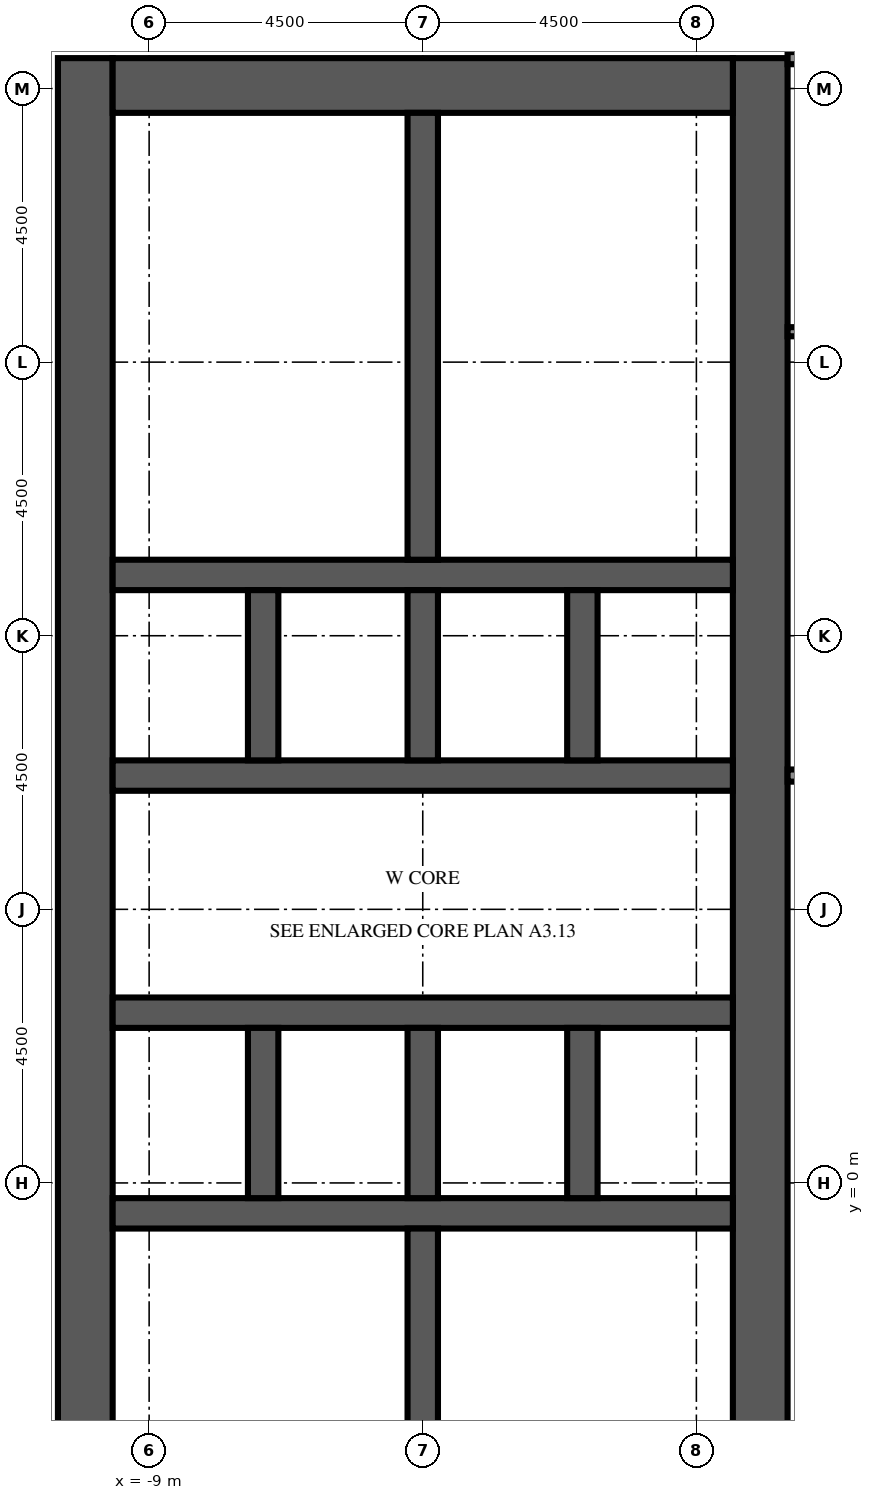
"""IFC4 building model, lengths in metres.
Left out: names, types, materials, properties, quantities, classifications, styles, units other than length and angle.
Written with IfcOpenShell. Run it as: python <this file> out.ifc"""

import sys

from ifc_helpers import new_model, si_unit, direction, frame, frame_2d, origin, place, context, subcontext, project, spatial, rectangle, extrude, element, fill, save


model = new_model("IFC4")
c1 = context("Model", 3, precision=1e-05, world=origin(), true_north=direction((0.0, 1.0)))
c2 = subcontext(c1, "Body", "Model", "MODEL_VIEW")
j1 = project(units=[si_unit("LENGTHUNIT", "METRE"), si_unit("PLANEANGLEUNIT", "RADIAN")], contexts=[c1])
p1 = place(None, origin())
s1 = spatial("IfcSite", under=j1, at=p1, CompositionType="ELEMENT")
p2 = place(p1, origin())
s2 = spatial("IfcBuilding", under=s1, at=p2, CompositionType="ELEMENT")
p3 = place(p2, frame((0.0, 0.0, 76.6)))
s3 = spatial("IfcBuildingStorey", under=s2, at=p3, CompositionType="ELEMENT", Elevation=76.6)
p4 = place(p3, frame((-10.05, -9.0, 0.0), z_axis=(0.0, 0.0, 1.0), x_axis=(0.0, 1.0, 0.0)))
e1 = element("IfcWall", 1, at=p4, inside=s3, PredefinedType="SHEAR", context=c2, shape_type="SweptSolid", body=[
    extrude(rectangle(XDim=27.5, YDim=0.9, at=frame_2d((13.75, 0.0))), origin(), (0.0, 0.0, 1.0), 5.4),
])
p5 = place(p4, frame((12.55, 0.0, 0.0)))
e2 = element("IfcOpeningElement", 2, at=p5, cuts=e1, PredefinedType="OPENING", context=c2, shape_type="SweptSolid", body=[
    extrude(rectangle(XDim=2.4, YDim=2.4, at=frame_2d((1.2, 1.2))), frame((0.0, 0.46, 0.0), z_axis=(0.0, -1.0, 0.0), x_axis=(1.0, 0.0, 0.0)), (0.0, 0.0, 1.0), 0.92),
])
p6 = place(p4, frame((6.825, 0.0, 0.0)))
e3 = element("IfcOpeningElement", 3, at=p6, cuts=e1, PredefinedType="OPENING", context=c2, shape_type="SweptSolid", body=[
    extrude(rectangle(XDim=1.2, YDim=2.1, at=frame_2d((0.6, 1.05))), frame((0.0, 0.46, 0.0), z_axis=(0.0, -1.0, 0.0), x_axis=(1.0, 0.0, 0.0)), (0.0, 0.0, 1.0), 0.92),
])
p7 = place(p4, frame((19.475, 0.0, 0.0)))
e4 = element("IfcOpeningElement", 4, at=p7, cuts=e1, PredefinedType="OPENING", context=c2, shape_type="SweptSolid", body=[
    extrude(rectangle(XDim=1.2, YDim=2.1, at=frame_2d((0.6, 1.05))), frame((0.0, 0.46, 0.0), z_axis=(0.0, -1.0, 0.0), x_axis=(1.0, 0.0, 0.0)), (0.0, 0.0, 1.0), 0.92),
])
p8 = place(p3, frame((1.05, -9.0, 0.0), z_axis=(0.0, 0.0, 1.0), x_axis=(0.0, 1.0, 0.0)))
e5 = element("IfcWall", 5, at=p8, inside=s3, PredefinedType="SHEAR", context=c2, shape_type="SweptSolid", body=[
    extrude(rectangle(XDim=27.5, YDim=0.9, at=frame_2d((13.75, 0.0))), origin(), (0.0, 0.0, 1.0), 5.4),
])
p9 = place(p8, frame((12.55, 0.0, 0.0)))
e6 = element("IfcOpeningElement", 6, at=p9, cuts=e5, PredefinedType="OPENING", context=c2, shape_type="SweptSolid", body=[
    extrude(rectangle(XDim=2.4, YDim=2.4, at=frame_2d((1.2, 1.2))), frame((0.0, 0.46, 0.0), z_axis=(0.0, -1.0, 0.0), x_axis=(1.0, 0.0, 0.0)), (0.0, 0.0, 1.0), 0.92),
])
p10 = place(p8, frame((5.445, 0.0, 0.0)))
e7 = element("IfcOpeningElement", 7, at=p10, cuts=e5, PredefinedType="OPENING", context=c2, shape_type="SweptSolid", body=[
    extrude(rectangle(XDim=1.2, YDim=2.1, at=frame_2d((0.6, 1.05))), frame((0.0, 0.46, 0.0), z_axis=(0.0, -1.0, 0.0), x_axis=(1.0, 0.0, 0.0)), (0.0, 0.0, 1.0), 0.92),
])
p11 = place(p8, frame((19.485, 0.0, 0.0)))
e8 = element("IfcOpeningElement", 8, at=p11, cuts=e5, PredefinedType="OPENING", context=c2, shape_type="SweptSolid", body=[
    extrude(rectangle(XDim=1.0, YDim=2.1, at=frame_2d((0.5, 1.05))), frame((0.0, 0.46, 0.0), z_axis=(0.0, -1.0, 0.0), x_axis=(1.0, 0.0, 0.0)), (0.0, 0.0, 1.0), 0.92),
])
p12 = place(p8, frame((21.139, 0.0, 0.0)))
e9 = element("IfcOpeningElement", 9, at=p12, cuts=e5, PredefinedType="OPENING", context=c2, shape_type="SweptSolid", body=[
    extrude(rectangle(XDim=1.0, YDim=2.1, at=frame_2d((0.5, 1.05))), frame((0.0, 0.46, 0.0), z_axis=(0.0, -1.0, 0.0), x_axis=(1.0, 0.0, 0.0)), (0.0, 0.0, 1.0), 0.92),
])
p13 = place(p8, frame((23.16, 0.0, 0.0)))
e10 = element("IfcOpeningElement", 10, at=p13, cuts=e5, PredefinedType="OPENING", context=c2, shape_type="SweptSolid", body=[
    extrude(rectangle(XDim=1.0, YDim=2.1, at=frame_2d((0.5, 1.05))), frame((0.0, 0.46, 0.0), z_axis=(0.0, -1.0, 0.0), x_axis=(1.0, 0.0, 0.0)), (0.0, 0.0, 1.0), 0.92),
])
p14 = place(p8, frame((25.181, 0.0, 0.0)))
e11 = element("IfcOpeningElement", 11, at=p14, cuts=e5, PredefinedType="OPENING", context=c2, shape_type="SweptSolid", body=[
    extrude(rectangle(XDim=1.0, YDim=2.1, at=frame_2d((0.5, 1.05))), frame((0.0, 0.46, 0.0), z_axis=(0.0, -1.0, 0.0), x_axis=(1.0, 0.0, 0.0)), (0.0, 0.0, 1.0), 0.92),
])
p15 = place(p3, frame((-9.6, 18.05, 0.0), z_axis=(0.0, 0.0, 1.0), x_axis=(1.0, 0.0, 0.0)))
e12 = element("IfcWall", 12, at=p15, inside=s3, PredefinedType="SHEAR", context=c2, shape_type="SweptSolid", body=[
    extrude(rectangle(XDim=10.2, YDim=0.9, at=frame_2d((5.1, 0.0))), origin(), (0.0, 0.0, 1.0), 5.4),
])
p16 = place(p3, frame((-9.6, -0.5, 0.0), z_axis=(0.0, 0.0, 1.0), x_axis=(1.0, 0.0, 0.0)))
e13 = element("IfcWall", 13, at=p16, inside=s3, PredefinedType="SHEAR", context=c2, shape_type="SweptSolid", body=[
    extrude(rectangle(XDim=10.2, YDim=0.5, at=frame_2d((5.1, 0.0))), origin(), (0.0, 0.0, 1.0), 5.4),
])
p17 = place(p3, frame((-9.6, 2.8, 0.0), z_axis=(0.0, 0.0, 1.0), x_axis=(1.0, 0.0, 0.0)))
e14 = element("IfcWall", 14, at=p17, inside=s3, PredefinedType="SHEAR", context=c2, shape_type="SweptSolid", body=[
    extrude(rectangle(XDim=10.2, YDim=0.5, at=frame_2d((5.1, 0.0))), origin(), (0.0, 0.0, 1.0), 5.4),
])
p18 = place(p17, frame((0.562, 0.0, 0.0)))
e15 = element("IfcOpeningElement", 15, at=p18, cuts=e14, PredefinedType="OPENING", context=c2, shape_type="SweptSolid", body=[
    extrude(rectangle(XDim=1.1, YDim=2.1, at=frame_2d((0.55, 1.05))), frame((0.0, 0.26, 0.0), z_axis=(0.0, -1.0, 0.0), x_axis=(1.0, 0.0, 0.0)), (0.0, 0.0, 1.0), 0.52),
])
p19 = place(p17, frame((3.238, 0.0, 0.0)))
e16 = element("IfcOpeningElement", 16, at=p19, cuts=e14, PredefinedType="OPENING", context=c2, shape_type="SweptSolid", body=[
    extrude(rectangle(XDim=1.1, YDim=2.1, at=frame_2d((0.55, 1.05))), frame((0.0, 0.26, 0.0), z_axis=(0.0, -1.0, 0.0), x_axis=(1.0, 0.0, 0.0)), (0.0, 0.0, 1.0), 0.52),
])
p20 = place(p17, frame((8.538, 0.0, 0.0)))
e17 = element("IfcOpeningElement", 17, at=p20, cuts=e14, PredefinedType="OPENING", context=c2, shape_type="SweptSolid", body=[
    extrude(rectangle(XDim=1.1, YDim=2.1, at=frame_2d((0.55, 1.05))), frame((0.0, 0.26, 0.0), z_axis=(0.0, -1.0, 0.0), x_axis=(1.0, 0.0, 0.0)), (0.0, 0.0, 1.0), 0.52),
])
p21 = place(p3, frame((-9.6, 6.7, 0.0), z_axis=(0.0, 0.0, 1.0), x_axis=(1.0, 0.0, 0.0)))
e18 = element("IfcWall", 18, at=p21, inside=s3, PredefinedType="SHEAR", context=c2, shape_type="SweptSolid", body=[
    extrude(rectangle(XDim=10.2, YDim=0.5, at=frame_2d((5.1, 0.0))), origin(), (0.0, 0.0, 1.0), 5.4),
])
p22 = place(p21, frame((0.562, 0.0, 0.0)))
e19 = element("IfcOpeningElement", 19, at=p22, cuts=e18, PredefinedType="OPENING", context=c2, shape_type="SweptSolid", body=[
    extrude(rectangle(XDim=1.1, YDim=2.1, at=frame_2d((0.55, 1.05))), frame((0.0, 0.26, 0.0), z_axis=(0.0, -1.0, 0.0), x_axis=(1.0, 0.0, 0.0)), (0.0, 0.0, 1.0), 0.52),
])
p23 = place(p21, frame((3.288, 0.0, 0.0)))
e20 = element("IfcOpeningElement", 20, at=p23, cuts=e18, PredefinedType="OPENING", context=c2, shape_type="SweptSolid", body=[
    extrude(rectangle(XDim=1.0, YDim=2.1, at=frame_2d((0.5, 1.05))), frame((0.0, 0.26, 0.0), z_axis=(0.0, -1.0, 0.0), x_axis=(1.0, 0.0, 0.0)), (0.0, 0.0, 1.0), 0.52),
])
p24 = place(p21, frame((5.913, 0.0, 0.0)))
e21 = element("IfcOpeningElement", 21, at=p24, cuts=e18, PredefinedType="OPENING", context=c2, shape_type="SweptSolid", body=[
    extrude(rectangle(XDim=1.0, YDim=2.1, at=frame_2d((0.5, 1.05))), frame((0.0, 0.26, 0.0), z_axis=(0.0, -1.0, 0.0), x_axis=(1.0, 0.0, 0.0)), (0.0, 0.0, 1.0), 0.52),
])
p25 = place(p21, frame((8.587, 0.0, 0.0)))
e22 = element("IfcOpeningElement", 22, at=p25, cuts=e18, PredefinedType="OPENING", context=c2, shape_type="SweptSolid", body=[
    extrude(rectangle(XDim=1.0, YDim=2.1, at=frame_2d((0.5, 1.05))), frame((0.0, 0.26, 0.0), z_axis=(0.0, -1.0, 0.0), x_axis=(1.0, 0.0, 0.0)), (0.0, 0.0, 1.0), 0.52),
])
p26 = place(p3, frame((-9.6, 10.0, 0.0), z_axis=(0.0, 0.0, 1.0), x_axis=(1.0, 0.0, 0.0)))
e23 = element("IfcWall", 23, at=p26, inside=s3, PredefinedType="SHEAR", context=c2, shape_type="SweptSolid", body=[
    extrude(rectangle(XDim=10.2, YDim=0.5, at=frame_2d((5.1, 0.0))), origin(), (0.0, 0.0, 1.0), 5.4),
])
for number, where, z_axis, x_axis in (
    (24, (-7.125, -0.25, 0.0), (0.0, 0.0, 1.0), (0.0, 1.0, 0.0)),
    (25, (-7.125, 6.95, 0.0), (0.0, 0.0, 1.0), (0.0, 1.0, 0.0)),
    (26, (-4.5, -0.25, 0.0), (0.0, 0.0, 1.0), (0.0, 1.0, 0.0)),
    (27, (-4.5, 6.95, 0.0), (0.0, 0.0, 1.0), (0.0, 1.0, 0.0)),
    (28, (-1.875, -0.25, 0.0), (0.0, 0.0, 1.0), (0.0, 1.0, 0.0)),
    (29, (-1.875, 6.95, 0.0), (0.0, 0.0, 1.0), (0.0, 1.0, 0.0)),
):
    element("IfcWall", number, at=place(p3, frame(where, z_axis=z_axis, x_axis=x_axis)), inside=s3, PredefinedType="SHEAR", context=c2, shape_type="SweptSolid", body=[
        extrude(rectangle(XDim=2.8, YDim=0.5, at=frame_2d((1.4, 0.0))), origin(), (0.0, 0.0, 1.0), 5.4),
    ])
for number, where, z_axis, x_axis in (
    (30, (-4.5, -8.1, 0.0), (0.0, 0.0, 1.0), (0.0, 1.0, 0.0)),
    (31, (-4.5, 10.25, 0.0), (0.0, 0.0, 1.0), (0.0, 1.0, 0.0)),
):
    element("IfcWall", number, at=place(p3, frame(where, z_axis=z_axis, x_axis=x_axis)), inside=s3, PredefinedType="SHEAR", context=c2, shape_type="SweptSolid", body=[
        extrude(rectangle(XDim=7.35, YDim=0.5, at=frame_2d((3.675, 0.0))), origin(), (0.0, 0.0, 1.0), 5.4),
    ])
p27 = place(p3, frame((-0.9, -5.16, 0.0), z_axis=(0.0, 0.0, 1.0), x_axis=(0.0, 1.0, 0.0)))
e32 = element("IfcWall", 32, at=p27, inside=s3, PredefinedType="PARTITIONING", context=c2, shape_type="SweptSolid", body=[
    extrude(rectangle(XDim=2.205, YDim=0.1, at=frame_2d((1.103, 0.0))), origin(), (0.0, 0.0, 1.0), 4.95),
])
p28 = place(p27, frame((0.603, 0.0, 0.0)))
e33 = element("IfcOpeningElement", 33, at=p28, cuts=e32, PredefinedType="OPENING", context=c2, shape_type="SweptSolid", body=[
    extrude(rectangle(XDim=1.0, YDim=2.1, at=frame_2d((0.5, 1.05))), frame((0.0, 0.06, 0.0), z_axis=(0.0, -1.0, 0.0), x_axis=(1.0, 0.0, 0.0)), (0.0, 0.0, 1.0), 0.12),
])
p29 = place(p3, frame((-0.9, -2.955, 0.0), z_axis=(0.0, 0.0, 1.0), x_axis=(0.0, 1.0, 0.0)))
e34 = element("IfcWall", 34, at=p29, inside=s3, PredefinedType="PARTITIONING", context=c2, shape_type="SweptSolid", body=[
    extrude(rectangle(XDim=2.205, YDim=0.1, at=frame_2d((1.103, 0.0))), origin(), (0.0, 0.0, 1.0), 4.95),
])
p30 = place(p29, frame((0.603, 0.0, 0.0)))
e35 = element("IfcOpeningElement", 35, at=p30, cuts=e34, PredefinedType="OPENING", context=c2, shape_type="SweptSolid", body=[
    extrude(rectangle(XDim=1.0, YDim=2.1, at=frame_2d((0.5, 1.05))), frame((0.0, 0.06, 0.0), z_axis=(0.0, -1.0, 0.0), x_axis=(1.0, 0.0, 0.0)), (0.0, 0.0, 1.0), 0.12),
])
p31 = place(p3, frame((-4.25, -2.955, 0.0), z_axis=(0.0, 0.0, 1.0), x_axis=(1.0, 0.0, 0.0)))
e36 = element("IfcWall", 36, at=p31, inside=s3, PredefinedType="PARTITIONING", context=c2, shape_type="SweptSolid", body=[
    extrude(rectangle(XDim=3.35, YDim=0.1, at=frame_2d((1.675, 0.0))), origin(), (0.0, 0.0, 1.0), 4.95),
])
for number, where, z_axis, x_axis in (
    (37, (-4.25, 11.72, 0.0), (0.0, 0.0, 1.0), (1.0, 0.0, 0.0)),
    (38, (-4.25, 13.558, 0.0), (0.0, 0.0, 1.0), (1.0, 0.0, 0.0)),
    (39, (-4.25, 15.762, 0.0), (0.0, 0.0, 1.0), (1.0, 0.0, 0.0)),
):
    element("IfcWall", number, at=place(p3, frame(where, z_axis=z_axis, x_axis=x_axis)), inside=s3, PredefinedType="PARTITIONING", context=c2, shape_type="SweptSolid", body=[
        extrude(rectangle(XDim=4.85, YDim=0.1, at=frame_2d((2.425, 0.0))), origin(), (0.0, 0.0, 1.0), 4.95),
    ])
p32 = place(p3, frame((1.5, 6.7, 0.0), z_axis=(0.0, 0.0, 1.0), x_axis=(1.0, 0.0, 0.0)))
e40 = element("IfcWall", 40, at=p32, inside=s3, PredefinedType="PARTITIONING", context=c2, shape_type="SweptSolid", body=[
    extrude(rectangle(XDim=4.5, YDim=0.2, at=frame_2d((2.25, 0.0))), origin(), (0.0, 0.0, 1.0), 4.95),
])
p33 = place(p32, frame((1.1, 0.0, 0.0)))
e41 = element("IfcOpeningElement", 41, at=p33, cuts=e40, PredefinedType="OPENING", context=c2, shape_type="SweptSolid", body=[
    extrude(rectangle(XDim=1.0, YDim=2.1, at=frame_2d((0.5, 1.05))), frame((0.0, 0.11, 0.0), z_axis=(0.0, -1.0, 0.0), x_axis=(1.0, 0.0, 0.0)), (0.0, 0.0, 1.0), 0.22),
])
p34 = place(p3, frame((1.5, 14.0, 0.0), z_axis=(0.0, 0.0, 1.0), x_axis=(1.0, 0.0, 0.0)))
e42 = element("IfcWall", 42, at=p34, inside=s3, PredefinedType="PARTITIONING", context=c2, shape_type="SweptSolid", body=[
    extrude(rectangle(XDim=4.5, YDim=0.15, at=frame_2d((2.25, 0.0))), origin(), (0.0, 0.0, 1.0), 4.95),
])
p35 = place(p34, frame((1.85, 0.0, 0.0)))
e43 = element("IfcOpeningElement", 43, at=p35, cuts=e42, PredefinedType="OPENING", context=c2, shape_type="SweptSolid", body=[
    extrude(rectangle(XDim=1.0, YDim=2.1, at=frame_2d((0.5, 1.05))), frame((0.0, 0.085, 0.0), z_axis=(0.0, -1.0, 0.0), x_axis=(1.0, 0.0, 0.0)), (0.0, 0.0, 1.0), 0.17),
])
p36 = place(p3, frame((1.5, 18.5, 0.0), z_axis=(0.0, 0.0, 1.0), x_axis=(1.0, 0.0, 0.0)))
e44 = element("IfcWall", 44, at=p36, inside=s3, PredefinedType="PARTITIONING", context=c2, shape_type="SweptSolid", body=[
    extrude(rectangle(XDim=4.5, YDim=0.2, at=frame_2d((2.25, 0.0))), origin(), (0.0, 0.0, 1.0), 4.95),
])
p37 = place(p18, origin())
e45 = element("IfcDoor", 45, at=p37, inside=s3, OperationType="DOUBLE_DOOR_SLIDING", PredefinedType="DOOR", context=c2, shape_type="SweptSolid", body=[
    extrude(rectangle(XDim=1.1, YDim=2.1, at=frame_2d((0.55, 1.05))), frame((0.0, 0.025, 0.0), z_axis=(0.0, -1.0, 0.0), x_axis=(1.0, 0.0, 0.0)), (0.0, 0.0, 1.0), 0.05),
])
fill(e15, e45)
p38 = place(p19, origin())
e46 = element("IfcDoor", 46, at=p38, inside=s3, OperationType="DOUBLE_DOOR_SLIDING", PredefinedType="DOOR", context=c2, shape_type="SweptSolid", body=[
    extrude(rectangle(XDim=1.1, YDim=2.1, at=frame_2d((0.55, 1.05))), frame((0.0, 0.025, 0.0), z_axis=(0.0, -1.0, 0.0), x_axis=(1.0, 0.0, 0.0)), (0.0, 0.0, 1.0), 0.05),
])
fill(e16, e46)
p39 = place(p20, origin())
e47 = element("IfcDoor", 47, at=p39, inside=s3, OperationType="DOUBLE_DOOR_SLIDING", PredefinedType="DOOR", context=c2, shape_type="SweptSolid", body=[
    extrude(rectangle(XDim=1.1, YDim=2.1, at=frame_2d((0.55, 1.05))), frame((0.0, 0.025, 0.0), z_axis=(0.0, -1.0, 0.0), x_axis=(1.0, 0.0, 0.0)), (0.0, 0.0, 1.0), 0.05),
])
fill(e17, e47)
p40 = place(p22, origin())
e48 = element("IfcDoor", 48, at=p40, inside=s3, OperationType="DOUBLE_DOOR_SLIDING", PredefinedType="DOOR", context=c2, shape_type="SweptSolid", body=[
    extrude(rectangle(XDim=1.1, YDim=2.1, at=frame_2d((0.55, 1.05))), frame((0.0, 0.025, 0.0), z_axis=(0.0, -1.0, 0.0), x_axis=(1.0, 0.0, 0.0)), (0.0, 0.0, 1.0), 0.05),
])
fill(e19, e48)
p41 = place(p5, origin())
e49 = element("IfcDoor", 49, at=p41, inside=s3, OperationType="DOUBLE_DOOR_DOUBLE_SWING", PredefinedType="DOOR", context=c2, shape_type="SweptSolid", body=[
    extrude(rectangle(XDim=2.4, YDim=2.4, at=frame_2d((1.2, 1.2))), frame((0.0, 0.025, 0.0), z_axis=(0.0, -1.0, 0.0), x_axis=(1.0, 0.0, 0.0)), (0.0, 0.0, 1.0), 0.05),
])
fill(e2, e49)
p42 = place(p9, origin())
e50 = element("IfcDoor", 50, at=p42, inside=s3, OperationType="DOUBLE_DOOR_DOUBLE_SWING", PredefinedType="DOOR", context=c2, shape_type="SweptSolid", body=[
    extrude(rectangle(XDim=2.4, YDim=2.4, at=frame_2d((1.2, 1.2))), frame((0.0, 0.025, 0.0), z_axis=(0.0, -1.0, 0.0), x_axis=(1.0, 0.0, 0.0)), (0.0, 0.0, 1.0), 0.05),
])
fill(e6, e50)
p43 = place(p6, origin())
e51 = element("IfcDoor", 51, at=p43, inside=s3, OperationType="SINGLE_SWING_LEFT", PredefinedType="DOOR", context=c2, shape_type="SweptSolid", body=[
    extrude(rectangle(XDim=1.2, YDim=2.1, at=frame_2d((0.6, 1.05))), frame((0.0, 0.025, 0.0), z_axis=(0.0, -1.0, 0.0), x_axis=(1.0, 0.0, 0.0)), (0.0, 0.0, 1.0), 0.05),
])
fill(e3, e51)
p44 = place(p7, origin())
e52 = element("IfcDoor", 52, at=p44, inside=s3, OperationType="SINGLE_SWING_LEFT", PredefinedType="DOOR", context=c2, shape_type="SweptSolid", body=[
    extrude(rectangle(XDim=1.2, YDim=2.1, at=frame_2d((0.6, 1.05))), frame((0.0, 0.025, 0.0), z_axis=(0.0, -1.0, 0.0), x_axis=(1.0, 0.0, 0.0)), (0.0, 0.0, 1.0), 0.05),
])
fill(e4, e52)
p45 = place(p23, origin())
e53 = element("IfcDoor", 53, at=p45, inside=s3, OperationType="SINGLE_SWING_RIGHT", PredefinedType="DOOR", context=c2, shape_type="SweptSolid", body=[
    extrude(rectangle(XDim=1.0, YDim=2.1, at=frame_2d((0.5, 1.05))), frame((0.0, 0.025, 0.0), z_axis=(0.0, -1.0, 0.0), x_axis=(1.0, 0.0, 0.0)), (0.0, 0.0, 1.0), 0.05),
])
fill(e20, e53)
p46 = place(p24, origin())
e54 = element("IfcDoor", 54, at=p46, inside=s3, OperationType="SINGLE_SWING_LEFT", PredefinedType="DOOR", context=c2, shape_type="SweptSolid", body=[
    extrude(rectangle(XDim=1.0, YDim=2.1, at=frame_2d((0.5, 1.05))), frame((0.0, 0.025, 0.0), z_axis=(0.0, -1.0, 0.0), x_axis=(1.0, 0.0, 0.0)), (0.0, 0.0, 1.0), 0.05),
])
fill(e21, e54)
p47 = place(p25, origin())
e55 = element("IfcDoor", 55, at=p47, inside=s3, OperationType="SINGLE_SWING_RIGHT", PredefinedType="DOOR", context=c2, shape_type="SweptSolid", body=[
    extrude(rectangle(XDim=1.0, YDim=2.1, at=frame_2d((0.5, 1.05))), frame((0.0, 0.025, 0.0), z_axis=(0.0, -1.0, 0.0), x_axis=(1.0, 0.0, 0.0)), (0.0, 0.0, 1.0), 0.05),
])
fill(e22, e55)
p48 = place(p10, origin())
e56 = element("IfcDoor", 56, at=p48, inside=s3, OperationType="SINGLE_SWING_LEFT", PredefinedType="DOOR", context=c2, shape_type="SweptSolid", body=[
    extrude(rectangle(XDim=1.2, YDim=2.1, at=frame_2d((0.6, 1.05))), frame((0.0, 0.425, 0.0), z_axis=(0.0, -1.0, 0.0), x_axis=(1.0, 0.0, 0.0)), (0.0, 0.0, 1.0), 0.05),
])
fill(e7, e56)
p49 = place(p28, origin())
e57 = element("IfcDoor", 57, at=p49, inside=s3, OperationType="SINGLE_SWING_LEFT", PredefinedType="DOOR", context=c2, shape_type="SweptSolid", body=[
    extrude(rectangle(XDim=1.0, YDim=2.1, at=frame_2d((0.5, 1.05))), frame((0.0, 0.025, 0.0), z_axis=(0.0, -1.0, 0.0), x_axis=(1.0, 0.0, 0.0)), (0.0, 0.0, 1.0), 0.05),
])
fill(e33, e57)
p50 = place(p30, origin())
e58 = element("IfcDoor", 58, at=p50, inside=s3, OperationType="SINGLE_SWING_RIGHT", PredefinedType="DOOR", context=c2, shape_type="SweptSolid", body=[
    extrude(rectangle(XDim=1.0, YDim=2.1, at=frame_2d((0.5, 1.05))), frame((0.0, 0.025, 0.0), z_axis=(0.0, -1.0, 0.0), x_axis=(1.0, 0.0, 0.0)), (0.0, 0.0, 1.0), 0.05),
])
fill(e35, e58)
p51 = place(p11, origin())
e59 = element("IfcDoor", 59, at=p51, inside=s3, OperationType="SINGLE_SWING_LEFT", PredefinedType="DOOR", context=c2, shape_type="SweptSolid", body=[
    extrude(rectangle(XDim=1.0, YDim=2.1, at=frame_2d((0.5, 1.05))), frame((0.0, 0.425, 0.0), z_axis=(0.0, -1.0, 0.0), x_axis=(1.0, 0.0, 0.0)), (0.0, 0.0, 1.0), 0.05),
])
fill(e8, e59)
p52 = place(p12, origin())
e60 = element("IfcDoor", 60, at=p52, inside=s3, OperationType="SINGLE_SWING_RIGHT", PredefinedType="DOOR", context=c2, shape_type="SweptSolid", body=[
    extrude(rectangle(XDim=1.0, YDim=2.1, at=frame_2d((0.5, 1.05))), frame((0.0, 0.425, 0.0), z_axis=(0.0, -1.0, 0.0), x_axis=(1.0, 0.0, 0.0)), (0.0, 0.0, 1.0), 0.05),
])
fill(e9, e60)
p53 = place(p13, origin())
e61 = element("IfcDoor", 61, at=p53, inside=s3, OperationType="SINGLE_SWING_LEFT", PredefinedType="DOOR", context=c2, shape_type="SweptSolid", body=[
    extrude(rectangle(XDim=1.0, YDim=2.1, at=frame_2d((0.5, 1.05))), frame((0.0, 0.425, 0.0), z_axis=(0.0, -1.0, 0.0), x_axis=(1.0, 0.0, 0.0)), (0.0, 0.0, 1.0), 0.05),
])
fill(e10, e61)
p54 = place(p14, origin())
e62 = element("IfcDoor", 62, at=p54, inside=s3, OperationType="SINGLE_SWING_RIGHT", PredefinedType="DOOR", context=c2, shape_type="SweptSolid", body=[
    extrude(rectangle(XDim=1.0, YDim=2.1, at=frame_2d((0.5, 1.05))), frame((0.0, 0.425, 0.0), z_axis=(0.0, -1.0, 0.0), x_axis=(1.0, 0.0, 0.0)), (0.0, 0.0, 1.0), 0.05),
])
fill(e11, e62)
save(model, sys.argv[1])
